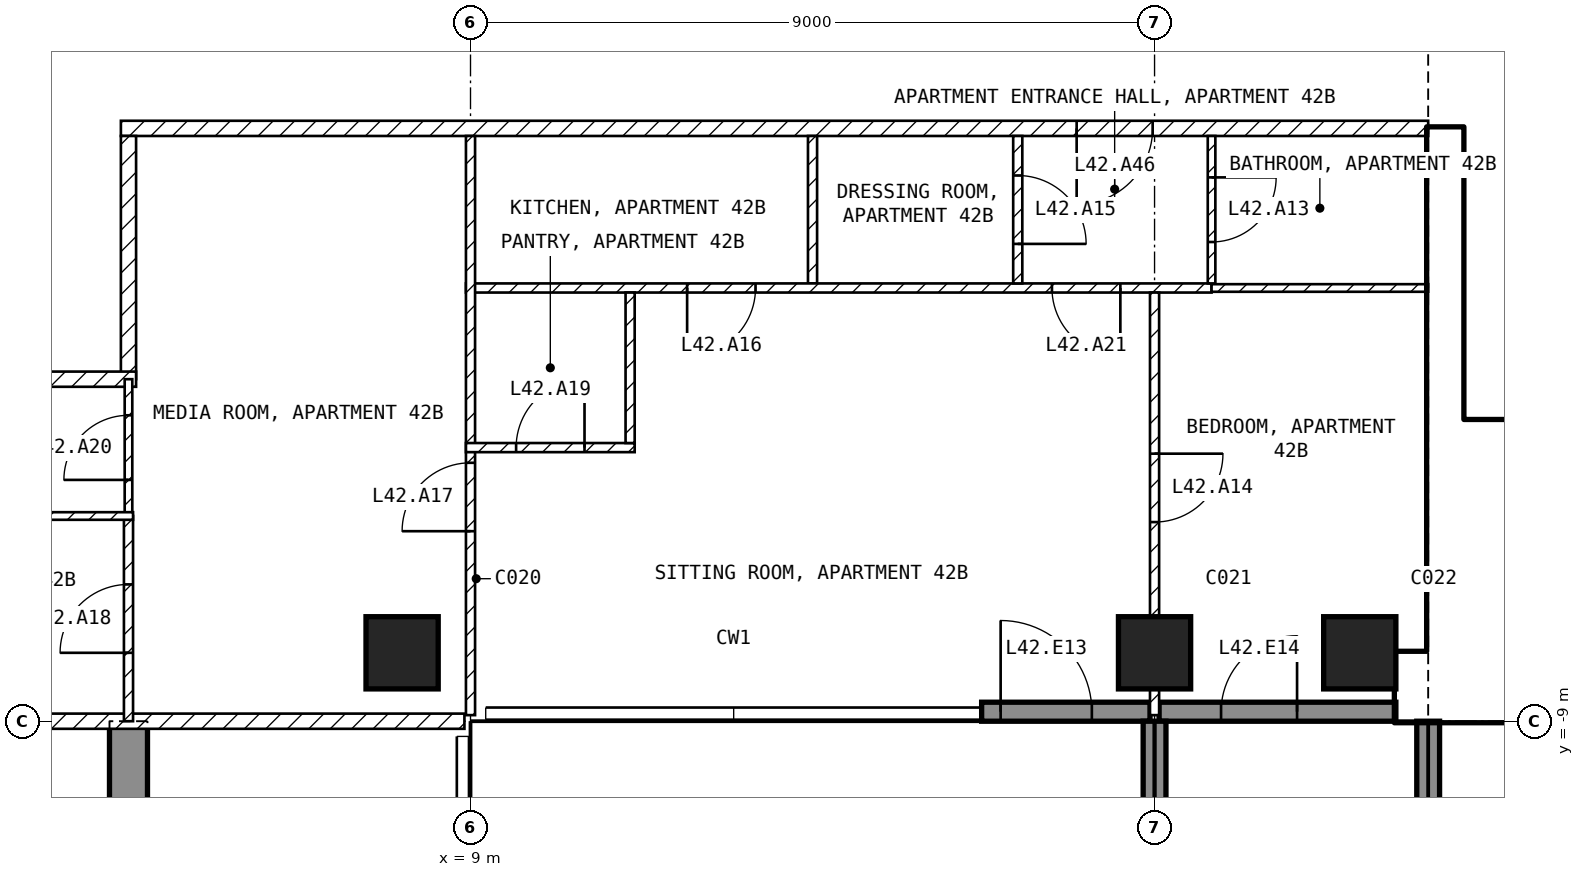
"""IFC4 building model, lengths in metres.
Left out: names, types, materials, properties, quantities, classifications, styles, units other than length and angle.
Written with IfcOpenShell. Run it as: python <this file> out.ifc"""

import sys

from ifc_helpers import new_model, si_unit, direction, frame, frame_2d, origin, origin_2d, place, context, subcontext, project, spatial, polyline, rectangle, outline, extrude, element, fill, save


model = new_model("IFC4")
c1 = context("Model", 3, precision=1e-05, world=origin(), true_north=direction((0.0, 1.0)))
c2 = subcontext(c1, "Body", "Model", "MODEL_VIEW")
j1 = project(units=[si_unit("LENGTHUNIT", "METRE"), si_unit("PLANEANGLEUNIT", "RADIAN")], contexts=[c1])
p1 = place(None, origin())
s1 = spatial("IfcSite", under=j1, at=p1, CompositionType="ELEMENT")
p2 = place(p1, origin())
s2 = spatial("IfcBuilding", under=s1, at=p2, CompositionType="ELEMENT")
p3 = place(p2, frame((0.0, 0.0, 173.6)))
s3 = spatial("IfcBuildingStorey", under=s2, at=p3, CompositionType="ELEMENT", Elevation=173.6)
for number, where, z_axis, x_axis in (
    (1, (8.1, -8.1, -0.25), (0.0, 0.0, 1.0), (1.0, 0.0, 0.0)),
    (2, (18.0, -8.1, -0.25), (0.0, 0.0, 1.0), (1.0, 0.0, 0.0)),
    (3, (20.7, -8.1, -0.25), (0.0, 0.0, 1.0), (1.0, 0.0, 0.0)),
):
    element("IfcColumn", number, at=place(p3, frame(where, z_axis=z_axis, x_axis=x_axis)), inside=s3, PredefinedType="COLUMN", context=c2, shape_type="SweptSolid", body=[
        extrude(rectangle(XDim=0.95, YDim=0.95, at=origin_2d()), origin(), (0.0, 0.0, 1.0), 3.5),
    ])
p4 = place(p3, frame((4.25, -20.225, -0.25), z_axis=(1.0, 0.0, 0.0), x_axis=(0.0, 1.0, 0.0)))
e4 = element("IfcWall", 4, at=p4, inside=s3, PredefinedType="SHEAR", context=c2, shape_type="SweptSolid", body=[
    extrude(outline(polyline([(0.0, 0.0), (6.725, 0.0), (6.725, 2.65), (9.125, 2.65), (9.125, 0.0), (11.225, 0.0), (11.225, 3.5), (0.0, 3.5), (0.0, 0.0)])), origin(), (0.0, 0.0, 1.0), 0.5),
])
p5 = place(p3, frame((15.725, -8.875, 0.0), z_axis=(0.0, 0.0, 1.0), x_axis=(1.0, 0.0, 0.0)))
e5 = element("IfcWall", 5, at=p5, inside=s3, PredefinedType="SOLIDWALL", context=c2, shape_type="SweptSolid", body=[
    extrude(rectangle(XDim=2.215, YDim=0.25, at=frame_2d((1.107, 0.0))), origin(), (0.0, 0.0, 1.0), 3.25),
])
p6 = place(p5, frame((0.25, 0.0, 0.0)))
e6 = element("IfcOpeningElement", 6, at=p6, cuts=e5, PredefinedType="OPENING", context=c2, shape_type="SweptSolid", body=[
    extrude(rectangle(XDim=1.2, YDim=2.4, at=frame_2d((0.6, 1.2))), frame((0.0, 0.135, 0.0), z_axis=(0.0, -1.0, 0.0), x_axis=(1.0, 0.0, 0.0)), (0.0, 0.0, 1.0), 0.27),
])
p7 = place(p3, frame((18.06, -8.875, 0.0), z_axis=(0.0, 0.0, 1.0), x_axis=(1.0, 0.0, 0.0)))
e7 = element("IfcWall", 7, at=p7, inside=s3, PredefinedType="SOLIDWALL", context=c2, shape_type="SweptSolid", body=[
    extrude(rectangle(XDim=3.115, YDim=0.25, at=frame_2d((1.558, 0.0))), origin(), (0.0, 0.0, 1.0), 3.25),
])
p8 = place(p7, frame((0.815, 0.0, 0.0)))
e8 = element("IfcOpeningElement", 8, at=p8, cuts=e7, PredefinedType="OPENING", context=c2, shape_type="SweptSolid", body=[
    extrude(rectangle(XDim=1.0, YDim=2.4, at=frame_2d((0.5, 1.2))), frame((0.0, 0.135, 0.0), z_axis=(0.0, -1.0, 0.0), x_axis=(1.0, 0.0, 0.0)), (0.0, 0.0, 1.0), 0.27),
])
for number, where, z_axis, x_axis in (
    (9, (18.0, -9.0, 0.0), (0.0, 0.0, 1.0), (0.0, -1.0, 0.0)),
    (10, (21.6, -9.0, 0.0), (0.0, 0.0, 1.0), (0.0, -1.0, 0.0)),
):
    element("IfcWall", number, at=place(p3, frame(where, z_axis=z_axis, x_axis=x_axis)), inside=s3, PredefinedType="SOLIDWALL", context=c2, shape_type="SweptSolid", body=[
        extrude(rectangle(XDim=2.7, YDim=0.3, at=frame_2d((1.35, 0.0))), origin(), (0.0, 0.0, 1.0), 3.25),
    ])
p9 = place(p3, frame((21.175, -8.55, 0.0), z_axis=(0.0, 0.0, 1.0), x_axis=(1.0, 0.0, 0.0)))
e11 = element("IfcWall", 11, at=p9, inside=s3, PredefinedType="SHEAR", context=c2, shape_type="SweptSolid", body=[
    extrude(rectangle(XDim=9.025, YDim=0.9, at=frame_2d((4.512, 0.0))), origin(), (0.0, 0.0, 1.0), 3.25),
])
p10 = place(p3, frame((21.825, -8.1, 0.0), z_axis=(0.0, 0.0, 1.0), x_axis=(0.0, 1.0, 0.0)))
e12 = element("IfcWall", 12, at=p10, inside=s3, PredefinedType="SHEAR", context=c2, shape_type="SweptSolid", body=[
    extrude(rectangle(XDim=6.9, YDim=0.45, at=frame_2d((3.45, 0.0))), origin(), (0.0, 0.0, 1.0), 3.25),
])
p11 = place(p3, frame((22.05, -5.15, 0.0), z_axis=(0.0, 0.0, 1.0), x_axis=(1.0, 0.0, 0.0)))
e13 = element("IfcWall", 13, at=p11, inside=s3, PredefinedType="SOLIDWALL", context=c2, shape_type="SweptSolid", body=[
    extrude(rectangle(XDim=6.3, YDim=0.2, at=frame_2d((3.15, 0.0))), origin(), (0.0, 0.0, 1.0), 3.25),
])
p12 = place(p11, frame((0.2, 0.0, 0.0)))
e14 = element("IfcOpeningElement", 14, at=p12, cuts=e13, PredefinedType="OPENING", context=c2, shape_type="SweptSolid", body=[
    extrude(rectangle(XDim=1.0, YDim=2.1, at=frame_2d((0.5, 1.05))), frame((0.0, 0.11, 0.0), z_axis=(0.0, -1.0, 0.0), x_axis=(1.0, 0.0, 0.0)), (0.0, 0.0, 1.0), 0.22),
])
p13 = place(p3, frame((21.6, -1.2, 0.0), z_axis=(0.0, 0.0, 1.0), x_axis=(-1.0, 0.0, 0.0)))
e15 = element("IfcWall", 15, at=p13, inside=s3, PredefinedType="PARTITIONING", context=c2, shape_type="SweptSolid", body=[
    extrude(rectangle(XDim=17.2, YDim=0.2, at=frame_2d((8.6, 0.0))), origin(), (0.0, 0.0, 1.0), 3.25),
])
p14 = place(p13, frame((3.625, 0.0, 0.0)))
e16 = element("IfcOpeningElement", 16, at=p14, cuts=e15, PredefinedType="OPENING", context=c2, shape_type="SweptSolid", body=[
    extrude(rectangle(XDim=1.0, YDim=2.1, at=frame_2d((0.5, 1.05))), frame((0.0, 0.11, 0.0), z_axis=(0.0, -1.0, 0.0), x_axis=(1.0, 0.0, 0.0)), (0.0, 0.0, 1.0), 0.22),
])
p15 = place(p3, frame((4.5, -1.3, 0.0), z_axis=(0.0, 0.0, 1.0), x_axis=(0.0, -1.0, 0.0)))
e17 = element("IfcWall", 17, at=p15, inside=s3, PredefinedType="PARTITIONING", context=c2, shape_type="SweptSolid", body=[
    extrude(rectangle(XDim=3.2, YDim=0.2, at=frame_2d((1.6, 0.0))), origin(), (0.0, 0.0, 1.0), 3.25),
])
p16 = place(p3, frame((4.6, -4.5, 0.0), z_axis=(0.0, 0.0, 1.0), x_axis=(-1.0, 0.0, 0.0)))
e18 = element("IfcWall", 18, at=p16, inside=s3, PredefinedType="PARTITIONING", context=c2, shape_type="SweptSolid", body=[
    extrude(rectangle(XDim=3.5, YDim=0.2, at=frame_2d((1.75, 0.0))), origin(), (0.0, 0.0, 1.0), 3.25),
])
p17 = place(p3, frame((8.92, -9.0, 0.0), z_axis=(0.0, 0.0, 1.0), x_axis=(-1.0, 0.0, 0.0)))
e19 = element("IfcWall", 19, at=p17, inside=s3, PredefinedType="PARTITIONING", context=c2, shape_type="SweptSolid", body=[
    extrude(rectangle(XDim=17.84, YDim=0.2, at=frame_2d((8.92, 0.0))), origin(), (0.0, 0.0, 1.0), 3.25),
])
p18 = place(p17, frame((8.42, 0.0, 0.0)))
e20 = element("IfcOpeningElement", 20, at=p18, cuts=e19, PredefinedType="OPENING", context=c2, shape_type="SweptSolid", body=[
    extrude(rectangle(XDim=1.0, YDim=2.1, at=frame_2d((0.5, 1.05))), frame((0.0, 0.11, 0.0), z_axis=(0.0, -1.0, 0.0), x_axis=(1.0, 0.0, 0.0)), (0.0, 0.0, 1.0), 0.22),
])
p19 = place(p3, frame((13.5, -1.3, 0.0), z_axis=(0.0, 0.0, 1.0), x_axis=(0.0, -1.0, 0.0)))
e21 = element("IfcWall", 21, at=p19, inside=s3, PredefinedType="PARTITIONING", context=c2, shape_type="SweptSolid", body=[
    extrude(rectangle(XDim=1.94, YDim=0.12, at=frame_2d((0.97, 0.0))), origin(), (0.0, 0.0, 1.0), 3.25),
])
p20 = place(p3, frame((18.75, -3.3, 0.0), z_axis=(0.0, 0.0, 1.0), x_axis=(-1.0, 0.0, 0.0)))
e22 = element("IfcWall", 22, at=p20, inside=s3, PredefinedType="PARTITIONING", context=c2, shape_type="SweptSolid", body=[
    extrude(rectangle(XDim=9.81, YDim=0.12, at=frame_2d((4.905, 0.0))), origin(), (0.0, 0.0, 1.0), 3.25),
])
p21 = place(p20, frame((6.0, 0.0, 0.0)))
e23 = element("IfcOpeningElement", 23, at=p21, cuts=e22, PredefinedType="OPENING", context=c2, shape_type="SweptSolid", body=[
    extrude(rectangle(XDim=0.9, YDim=2.1, at=frame_2d((0.45, 1.05))), frame((0.0, 0.07, 0.0), z_axis=(0.0, -1.0, 0.0), x_axis=(1.0, 0.0, 0.0)), (0.0, 0.0, 1.0), 0.14),
])
p22 = place(p20, frame((1.2, 0.0, 0.0)))
e24 = element("IfcOpeningElement", 24, at=p22, cuts=e22, PredefinedType="OPENING", context=c2, shape_type="SweptSolid", body=[
    extrude(rectangle(XDim=0.9, YDim=2.1, at=frame_2d((0.45, 1.05))), frame((0.0, 0.07, 0.0), z_axis=(0.0, -1.0, 0.0), x_axis=(1.0, 0.0, 0.0)), (0.0, 0.0, 1.0), 0.14),
])
p23 = place(p3, frame((9.0, -8.92, 0.0), z_axis=(0.0, 0.0, 1.0), x_axis=(0.0, 1.0, 0.0)))
e25 = element("IfcWall", 25, at=p23, inside=s3, PredefinedType="PARTITIONING", context=c2, shape_type="SweptSolid", body=[
    extrude(rectangle(XDim=7.62, YDim=0.12, at=frame_2d((3.81, 0.0))), origin(), (0.0, 0.0, 1.0), 3.25),
])
p24 = place(p23, frame((2.42, 0.0, 0.0)))
e26 = element("IfcOpeningElement", 26, at=p24, cuts=e25, PredefinedType="OPENING", context=c2, shape_type="SweptSolid", body=[
    extrude(rectangle(XDim=0.9, YDim=2.1, at=frame_2d((0.45, 1.05))), frame((0.0, 0.07, 0.0), z_axis=(0.0, -1.0, 0.0), x_axis=(1.0, 0.0, 0.0)), (0.0, 0.0, 1.0), 0.14),
])
p25 = place(p3, frame((16.2, -1.3, 0.0), z_axis=(0.0, 0.0, 1.0), x_axis=(0.0, -1.0, 0.0)))
e27 = element("IfcWall", 27, at=p25, inside=s3, PredefinedType="PARTITIONING", context=c2, shape_type="SweptSolid", body=[
    extrude(rectangle(XDim=1.94, YDim=0.12, at=frame_2d((0.97, 0.0))), origin(), (0.0, 0.0, 1.0), 3.25),
])
p26 = place(p25, frame((0.52, 0.0, 0.0)))
e28 = element("IfcOpeningElement", 28, at=p26, cuts=e27, PredefinedType="OPENING", context=c2, shape_type="SweptSolid", body=[
    extrude(rectangle(XDim=0.9, YDim=2.1, at=frame_2d((0.45, 1.05))), frame((0.0, 0.07, 0.0), z_axis=(0.0, -1.0, 0.0), x_axis=(1.0, 0.0, 0.0)), (0.0, 0.0, 1.0), 0.14),
])
p27 = place(p3, frame((18.75, -1.3, 0.0), z_axis=(0.0, 0.0, 1.0), x_axis=(0.0, -1.0, 0.0)))
e29 = element("IfcWall", 29, at=p27, inside=s3, PredefinedType="PARTITIONING", context=c2, shape_type="SweptSolid", body=[
    extrude(rectangle(XDim=1.94, YDim=0.1, at=frame_2d((0.97, 0.0))), origin(), (0.0, 0.0, 1.0), 3.25),
])
p28 = place(p27, frame((0.545, 0.0, 0.0)))
e30 = element("IfcOpeningElement", 30, at=p28, cuts=e29, PredefinedType="OPENING", context=c2, shape_type="SweptSolid", body=[
    extrude(rectangle(XDim=0.85, YDim=2.1, at=frame_2d((0.425, 1.05))), frame((0.0, 0.06, 0.0), z_axis=(0.0, -1.0, 0.0), x_axis=(1.0, 0.0, 0.0)), (0.0, 0.0, 1.0), 0.12),
])
p29 = place(p3, frame((21.6, -3.3, 0.0), z_axis=(0.0, 0.0, 1.0), x_axis=(-1.0, 0.0, 0.0)))
e31 = element("IfcWall", 31, at=p29, inside=s3, PredefinedType="PARTITIONING", context=c2, shape_type="SweptSolid", body=[
    extrude(rectangle(XDim=2.85, YDim=0.1, at=frame_2d((1.425, 0.0))), origin(), (0.0, 0.0, 1.0), 3.25),
])
p30 = place(p3, frame((8.94, -5.4, 0.0), z_axis=(0.0, 0.0, 1.0), x_axis=(1.0, 0.0, 0.0)))
e32 = element("IfcWall", 32, at=p30, inside=s3, PredefinedType="PARTITIONING", context=c2, shape_type="SweptSolid", body=[
    extrude(rectangle(XDim=2.22, YDim=0.12, at=frame_2d((1.11, 0.0))), origin(), (0.0, 0.0, 1.0), 3.25),
])
p31 = place(p30, frame((0.66, 0.0, 0.0)))
e33 = element("IfcOpeningElement", 33, at=p31, cuts=e32, PredefinedType="OPENING", context=c2, shape_type="SweptSolid", body=[
    extrude(rectangle(XDim=0.9, YDim=2.1, at=frame_2d((0.45, 1.05))), frame((0.0, 0.07, 0.0), z_axis=(0.0, -1.0, 0.0), x_axis=(1.0, 0.0, 0.0)), (0.0, 0.0, 1.0), 0.14),
])
p32 = place(p3, frame((11.1, -5.34, 0.0), z_axis=(0.0, 0.0, 1.0), x_axis=(0.0, 1.0, 0.0)))
e34 = element("IfcWall", 34, at=p32, inside=s3, PredefinedType="PARTITIONING", context=c2, shape_type="SweptSolid", body=[
    extrude(rectangle(XDim=1.98, YDim=0.12, at=frame_2d((0.99, 0.0))), origin(), (0.0, 0.0, 1.0), 3.25),
])
p33 = place(p3, frame((18.0, -3.36, 0.0), z_axis=(0.0, 0.0, 1.0), x_axis=(0.0, -1.0, 0.0)))
e35 = element("IfcWall", 35, at=p33, inside=s3, PredefinedType="PARTITIONING", context=c2, shape_type="SweptSolid", body=[
    extrude(rectangle(XDim=5.56, YDim=0.12, at=frame_2d((2.78, 0.0))), origin(), (0.0, 0.0, 1.0), 2.48),
])
p34 = place(p33, frame((2.12, 0.0, 0.0)))
e36 = element("IfcOpeningElement", 36, at=p34, cuts=e35, PredefinedType="OPENING", context=c2, shape_type="SweptSolid", body=[
    extrude(rectangle(XDim=0.9, YDim=2.1, at=frame_2d((0.45, 1.05))), frame((0.0, 0.07, 0.0), z_axis=(0.0, -1.0, 0.0), x_axis=(1.0, 0.0, 0.0)), (0.0, 0.0, 1.0), 0.14),
])
p35 = place(p3, frame((4.5, -6.3, 0.0), z_axis=(0.0, 0.0, 1.0), x_axis=(0.0, 1.0, 0.0)))
e37 = element("IfcWall", 37, at=p35, inside=s3, PredefinedType="PARTITIONING", context=c2, shape_type="SweptSolid", body=[
    extrude(rectangle(XDim=1.8, YDim=0.1, at=frame_2d((0.9, 0.0))), origin(), (0.0, 0.0, 1.0), 3.25),
])
p36 = place(p35, frame((0.475, 0.0, 0.0)))
e38 = element("IfcOpeningElement", 38, at=p36, cuts=e37, PredefinedType="OPENING", context=c2, shape_type="SweptSolid", body=[
    extrude(rectangle(XDim=0.85, YDim=2.1, at=frame_2d((0.425, 1.05))), frame((0.0, 0.06, 0.0), z_axis=(0.0, -1.0, 0.0), x_axis=(1.0, 0.0, 0.0)), (0.0, 0.0, 1.0), 0.12),
])
p37 = place(p3, frame((4.5, -9.0, 0.0), z_axis=(0.0, 0.0, 1.0), x_axis=(0.0, 1.0, 0.0)))
e39 = element("IfcWall", 39, at=p37, inside=s3, PredefinedType="PARTITIONING", context=c2, shape_type="SweptSolid", body=[
    extrude(rectangle(XDim=2.7, YDim=0.12, at=frame_2d((1.35, 0.0))), origin(), (0.0, 0.0, 1.0), 3.25),
])
p38 = place(p37, frame((0.9, 0.0, 0.0)))
e40 = element("IfcOpeningElement", 40, at=p38, cuts=e39, PredefinedType="OPENING", context=c2, shape_type="SweptSolid", body=[
    extrude(rectangle(XDim=0.9, YDim=2.1, at=frame_2d((0.45, 1.05))), frame((0.0, 0.07, 0.0), z_axis=(0.0, -1.0, 0.0), x_axis=(1.0, 0.0, 0.0)), (0.0, 0.0, 1.0), 0.14),
])
p39 = place(p3, frame((4.56, -6.3, 0.0), z_axis=(0.0, 0.0, 1.0), x_axis=(-1.0, 0.0, 0.0)))
e41 = element("IfcWall", 41, at=p39, inside=s3, PredefinedType="PARTITIONING", context=c2, shape_type="SweptSolid", body=[
    extrude(rectangle(XDim=3.46, YDim=0.1, at=frame_2d((1.73, 0.0))), origin(), (0.0, 0.0, 1.0), 3.25),
])
p40 = place(p6, origin())
e42 = element("IfcDoor", 42, at=p40, inside=s3, OperationType="SINGLE_SWING_LEFT", PredefinedType="DOOR", context=c2, shape_type="SweptSolid", body=[
    extrude(rectangle(XDim=1.2, YDim=2.4, at=frame_2d((0.6, 1.2))), frame((0.0, 0.025, 0.0), z_axis=(0.0, -1.0, 0.0), x_axis=(1.0, 0.0, 0.0)), (0.0, 0.0, 1.0), 0.05),
])
fill(e6, e42)
p41 = place(p8, origin())
e43 = element("IfcDoor", 43, at=p41, inside=s3, OperationType="SINGLE_SWING_RIGHT", PredefinedType="DOOR", context=c2, shape_type="SweptSolid", body=[
    extrude(rectangle(XDim=1.0, YDim=2.4, at=frame_2d((0.5, 1.2))), frame((0.0, 0.025, 0.0), z_axis=(0.0, -1.0, 0.0), x_axis=(1.0, 0.0, 0.0)), (0.0, 0.0, 1.0), 0.05),
])
fill(e8, e43)
p42 = place(p12, origin())
e44 = element("IfcDoor", 44, at=p42, inside=s3, OperationType="SINGLE_SWING_LEFT", PredefinedType="DOOR", context=c2, shape_type="SweptSolid", body=[
    extrude(rectangle(XDim=1.0, YDim=2.1, at=frame_2d((0.5, 1.05))), frame((0.0, 0.025, 0.0), z_axis=(0.0, -1.0, 0.0), x_axis=(1.0, 0.0, 0.0)), (0.0, 0.0, 1.0), 0.05),
])
fill(e14, e44)
p43 = place(p28, origin())
e45 = element("IfcDoor", 45, at=p43, inside=s3, OperationType="SINGLE_SWING_LEFT", PredefinedType="DOOR", context=c2, shape_type="SweptSolid", body=[
    extrude(rectangle(XDim=0.85, YDim=2.1, at=frame_2d((0.425, 1.05))), frame((0.0, 0.025, 0.0), z_axis=(0.0, -1.0, 0.0), x_axis=(1.0, 0.0, 0.0)), (0.0, 0.0, 1.0), 0.05),
])
fill(e30, e45)
p44 = place(p34, origin())
e46 = element("IfcDoor", 46, at=p44, inside=s3, OperationType="SINGLE_SWING_LEFT", PredefinedType="DOOR", context=c2, shape_type="SweptSolid", body=[
    extrude(rectangle(XDim=0.9, YDim=2.1, at=frame_2d((0.45, 1.05))), frame((0.0, 0.025, 0.0), z_axis=(0.0, -1.0, 0.0), x_axis=(1.0, 0.0, 0.0)), (0.0, 0.0, 1.0), 0.05),
])
fill(e36, e46)
p45 = place(p26, origin())
e47 = element("IfcDoor", 47, at=p45, inside=s3, OperationType="SINGLE_SWING_RIGHT", PredefinedType="DOOR", context=c2, shape_type="SweptSolid", body=[
    extrude(rectangle(XDim=0.9, YDim=2.1, at=frame_2d((0.45, 1.05))), frame((0.0, 0.025, 0.0), z_axis=(0.0, -1.0, 0.0), x_axis=(1.0, 0.0, 0.0)), (0.0, 0.0, 1.0), 0.05),
])
fill(e28, e47)
p46 = place(p21, origin())
e48 = element("IfcDoor", 48, at=p46, inside=s3, OperationType="SINGLE_SWING_RIGHT", PredefinedType="DOOR", context=c2, shape_type="SweptSolid", body=[
    extrude(rectangle(XDim=0.9, YDim=2.1, at=frame_2d((0.45, 1.05))), frame((0.0, 0.025, 0.0), z_axis=(0.0, -1.0, 0.0), x_axis=(1.0, 0.0, 0.0)), (0.0, 0.0, 1.0), 0.05),
])
fill(e23, e48)
p47 = place(p24, origin())
e49 = element("IfcDoor", 49, at=p47, inside=s3, OperationType="SINGLE_SWING_LEFT", PredefinedType="DOOR", context=c2, shape_type="SweptSolid", body=[
    extrude(rectangle(XDim=0.9, YDim=2.1, at=frame_2d((0.45, 1.05))), frame((0.0, 0.025, 0.0), z_axis=(0.0, -1.0, 0.0), x_axis=(1.0, 0.0, 0.0)), (0.0, 0.0, 1.0), 0.05),
])
fill(e26, e49)
p48 = place(p38, origin())
e50 = element("IfcDoor", 50, at=p48, inside=s3, OperationType="SINGLE_SWING_LEFT", PredefinedType="DOOR", context=c2, shape_type="SweptSolid", body=[
    extrude(rectangle(XDim=0.9, YDim=2.1, at=frame_2d((0.45, 1.05))), frame((0.0, 0.025, 0.0), z_axis=(0.0, -1.0, 0.0), x_axis=(1.0, 0.0, 0.0)), (0.0, 0.0, 1.0), 0.05),
])
fill(e40, e50)
p49 = place(p31, origin())
e51 = element("IfcDoor", 51, at=p49, inside=s3, OperationType="SINGLE_SWING_RIGHT", PredefinedType="DOOR", context=c2, shape_type="SweptSolid", body=[
    extrude(rectangle(XDim=0.9, YDim=2.1, at=frame_2d((0.45, 1.05))), frame((0.0, 0.025, 0.0), z_axis=(0.0, -1.0, 0.0), x_axis=(1.0, 0.0, 0.0)), (0.0, 0.0, 1.0), 0.05),
])
fill(e33, e51)
p50 = place(p36, origin())
e52 = element("IfcDoor", 52, at=p50, inside=s3, OperationType="SINGLE_SWING_LEFT", PredefinedType="DOOR", context=c2, shape_type="SweptSolid", body=[
    extrude(rectangle(XDim=0.85, YDim=2.1, at=frame_2d((0.425, 1.05))), frame((0.0, 0.025, 0.0), z_axis=(0.0, -1.0, 0.0), x_axis=(1.0, 0.0, 0.0)), (0.0, 0.0, 1.0), 0.05),
])
fill(e38, e52)
p51 = place(p22, origin())
e53 = element("IfcDoor", 53, at=p51, inside=s3, OperationType="SINGLE_SWING_LEFT", PredefinedType="DOOR", context=c2, shape_type="SweptSolid", body=[
    extrude(rectangle(XDim=0.9, YDim=2.1, at=frame_2d((0.45, 1.05))), frame((0.0, 0.025, 0.0), z_axis=(0.0, -1.0, 0.0), x_axis=(1.0, 0.0, 0.0)), (0.0, 0.0, 1.0), 0.05),
])
fill(e24, e53)
p52 = place(p14, origin())
e54 = element("IfcDoor", 54, at=p52, inside=s3, OperationType="SINGLE_SWING_RIGHT", PredefinedType="DOOR", context=c2, shape_type="SweptSolid", body=[
    extrude(rectangle(XDim=1.0, YDim=2.1, at=frame_2d((0.5, 1.05))), frame((0.0, 0.025, 0.0), z_axis=(0.0, -1.0, 0.0), x_axis=(1.0, 0.0, 0.0)), (0.0, 0.0, 1.0), 0.05),
])
fill(e16, e54)
save(model, sys.argv[1])
